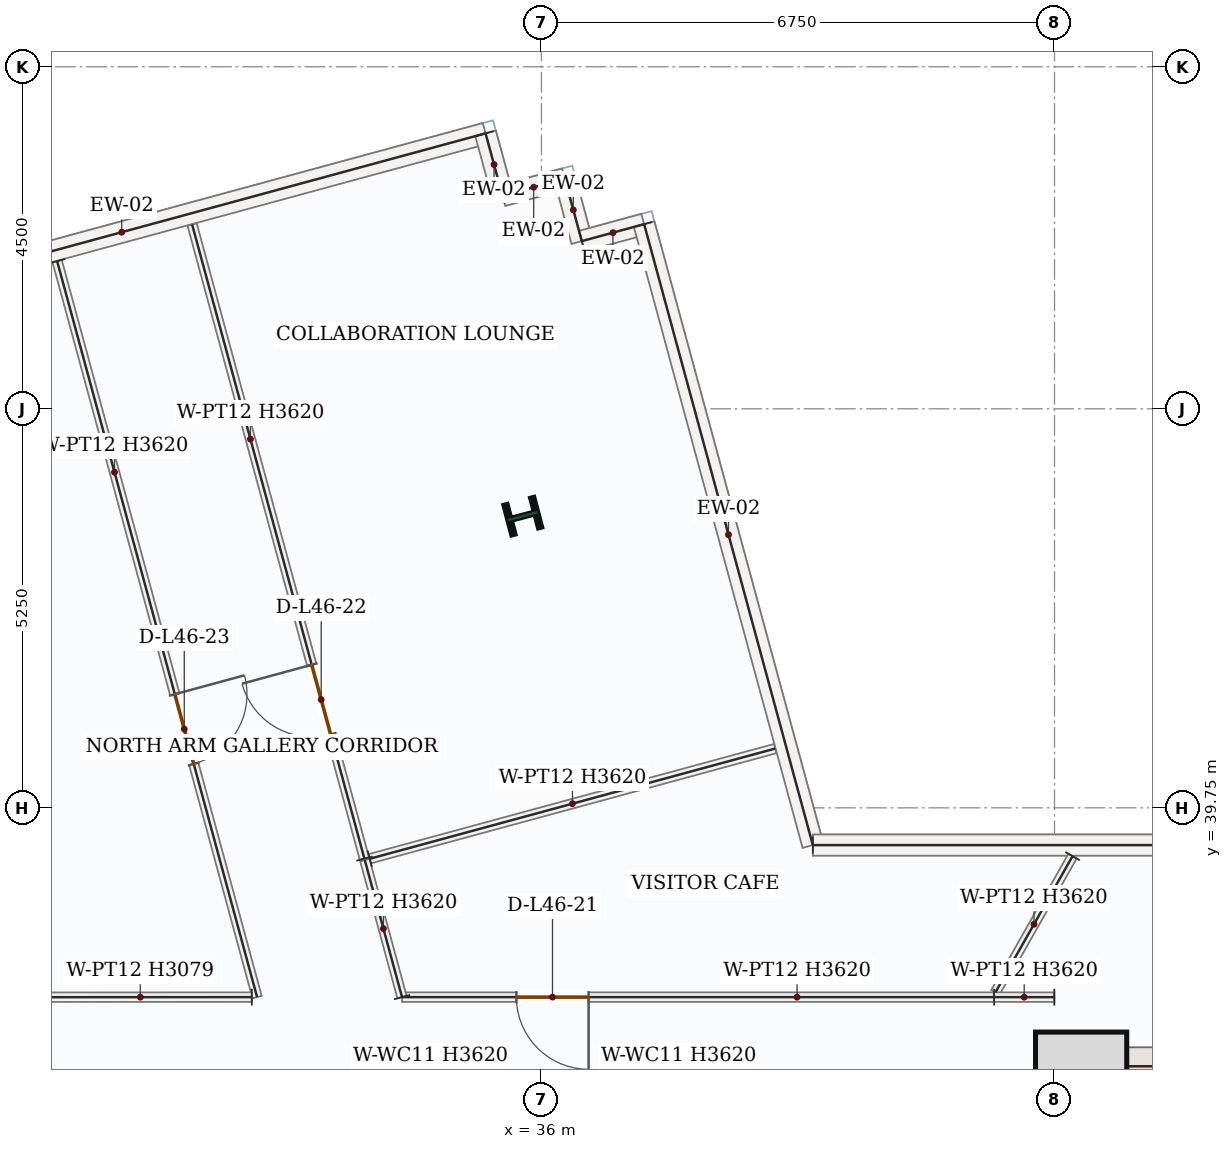
"""IFC4 building model, lengths in metres.
Left out: names, types, materials, properties, quantities, classifications, styles, units other than length and angle.
Written with IfcOpenShell. Run it as: python <this file> out.ifc"""

import sys

from ifc_helpers import new_model, si_unit, direction, frame, frame_2d, origin, origin_2d, place, context, subcontext, project, spatial, rectangle, i_section, extrude, source, transform, mapped, element, fill, save


model = new_model("IFC4")
c1 = context("Model", 3, precision=1e-05, world=origin(), true_north=direction((0.0, 1.0)))
c2 = subcontext(c1, "Body", "Model", "MODEL_VIEW")
j1 = project(units=[si_unit("LENGTHUNIT", "METRE"), si_unit("PLANEANGLEUNIT", "RADIAN")], contexts=[c1])
p1 = place(None, origin())
s1 = spatial("IfcSite", under=j1, at=p1, CompositionType="ELEMENT")
p2 = place(p1, origin())
s2 = spatial("IfcBuilding", under=s1, at=p2, CompositionType="ELEMENT")
p3 = place(p2, frame((0.0, 0.0, 198.0)))
s3 = spatial("IfcBuildingStorey", under=s2, at=p3, CompositionType="ELEMENT", Elevation=198.0)
p4 = place(p3, frame((43.0, 28.05, 0.0), z_axis=(0.0, 0.0, 1.0), x_axis=(0.0, 1.0, 0.0)))
e1 = element("IfcWall", 1, at=p4, inside=s3, PredefinedType="SHEAR", context=c2, shape_type="SweptSolid", body=[
    extrude(rectangle(XDim=8.55, YDim=0.5, at=frame_2d((4.275, 0.0))), origin(), (0.0, 0.0, 1.0), 3.62),
])
p5 = place(p4, frame((1.5, 0.0, 0.0)))
e2 = element("IfcOpeningElement", 2, at=p5, cuts=e1, PredefinedType="OPENING", context=c2, shape_type="SweptSolid", body=[
    extrude(rectangle(XDim=1.1, YDim=2.2, at=frame_2d((0.55, 1.1))), frame((0.0, 0.26, 0.0), z_axis=(0.0, -1.0, 0.0), x_axis=(1.0, 0.0, 0.0)), (0.0, 0.0, 1.0), 0.52),
])
m1 = source(origin(), c2, "Body", "SweptSolid", [
    extrude(rectangle(XDim=7.0, YDim=0.5, at=frame_2d((3.5, 0.0))), origin(), (0.0, 0.0, 1.0), 3.62),
])
p6 = place(p3, frame((43.25, 36.35, 0.0), z_axis=(0.0, 0.0, 1.0), x_axis=(1.0, 0.0, 0.0)))
e3 = element("IfcWall", 3, at=p6, inside=s3, PredefinedType="SHEAR", context=c2, shape_type="MappedRepresentation", body=[
    mapped(m1, transform((0.0, 0.0, 0.0), x_axis=(1.0, 0.0, 0.0), y_axis=(0.0, 1.0, 0.0), z_axis=(0.0, 0.0, 1.0), scale=1.0)),
])
m2 = source(origin(), c2, "Body", "SweptSolid", [
    extrude(rectangle(XDim=1.2, YDim=1.2, at=origin_2d()), origin(), (0.0, 0.0, 1.0), 3.9),
])
p7 = place(p3, frame((43.1, 36.2, 0.0), z_axis=(0.0, 0.0, 1.0), x_axis=(1.0, 0.0, 0.0)))
e4 = element("IfcColumn", 4, at=p7, inside=s3, PredefinedType="COLUMN", context=c2, shape_type="MappedRepresentation", body=[
    mapped(m2, transform((0.0, 0.0, 0.0), x_axis=(1.0, 0.0, 0.0), y_axis=(0.0, 1.0, 0.0), z_axis=(0.0, 0.0, 1.0), scale=1.0)),
])
m3 = source(origin(), c2, "Body", "SweptSolid", [
    extrude(i_section(OverallWidth=0.404, OverallDepth=0.407, WebThickness=0.027, FlangeThickness=0.044, FilletRadius=0.018, at=origin_2d()), origin(), (0.0, 0.0, 1.0), 3.9),
])
p8 = place(p3, frame((35.755, 43.588, 0.0), z_axis=(0.0, 0.0, 1.0), x_axis=(-0.255445757936, 0.966823388604, 0.0)))
e5 = element("IfcColumn", 5, at=p8, inside=s3, PredefinedType="COLUMN", context=c2, shape_type="MappedRepresentation", body=[
    mapped(m3, transform((0.0, 0.0, 0.0), x_axis=(1.0, 0.0, 0.0), y_axis=(0.0, 1.0, 0.0), z_axis=(0.0, 0.0, 1.0), scale=1.0)),
])
m4 = source(origin(), c2, "Body", "SweptSolid", [
    extrude(rectangle(XDim=9.92, YDim=0.28, at=frame_2d((4.96, 0.0))), origin(), (0.0, 0.0, 1.0), 3.62),
])
p9 = place(p3, frame((25.692, 46.023, 0.0), z_axis=(0.0, 0.0, 1.0), x_axis=(0.965012714082, 0.262203092393, 0.0)))
e6 = element("IfcWall", 6, at=p9, inside=s3, PredefinedType="SOLIDWALL", context=c2, shape_type="MappedRepresentation", body=[
    mapped(m4, transform((0.0, 0.0, 0.0), x_axis=(1.0, 0.0, 0.0), y_axis=(0.0, 1.0, 0.0), z_axis=(0.0, 0.0, 1.0), scale=1.0)),
])
m5 = source(origin(), c2, "Body", "SweptSolid", [
    extrude(rectangle(XDim=0.85, YDim=0.28, at=frame_2d((0.425, 0.0))), origin(), (0.0, 0.0, 1.0), 3.62),
])
for number, where, z_axis, x_axis in (
    (7, (35.265, 48.624, 0.0), (0.0, 0.0, 1.0), (0.262, -0.965, 0.0)),
    (8, (35.488, 47.803, 0.0), (0.0, 0.0, 1.0), (0.965, 0.262, 0.0)),
    (9, (36.308, 48.026, 0.0), (0.0, 0.0, 1.0), (0.262, -0.965, 0.0)),
    (10, (36.531, 47.206, 0.0), (0.0, 0.0, 1.0), (0.965, 0.262, 0.0)),
):
    element("IfcWall", number, at=place(p3, frame(where, z_axis=z_axis, x_axis=x_axis)), inside=s3, PredefinedType="SOLIDWALL", context=c2, shape_type="MappedRepresentation", body=[
        mapped(m5, transform((0.0, 0.0, 0.0), x_axis=(1.0, 0.0, 0.0), y_axis=(0.0, 1.0, 0.0), z_axis=(0.0, 0.0, 1.0), scale=1.0)),
    ])
m6 = source(origin(), c2, "Body", "SweptSolid", [
    extrude(rectangle(XDim=8.465, YDim=0.28, at=frame_2d((4.232, 0.0))), origin(), (0.0, 0.0, 1.0), 3.62),
])
p10 = place(p3, frame((37.351, 47.429, 0.0), z_axis=(0.0, 0.0, 1.0), x_axis=(0.262192380254, -0.965015624608, 0.0)))
e11 = element("IfcWall", 11, at=p10, inside=s3, PredefinedType="SOLIDWALL", context=c2, shape_type="MappedRepresentation", body=[
    mapped(m6, transform((0.0, 0.0, 0.0), x_axis=(1.0, 0.0, 0.0), y_axis=(0.0, 1.0, 0.0), z_axis=(0.0, 0.0, 1.0), scale=1.0)),
])
m7 = source(origin(), c2, "Body", "SweptSolid", [
    extrude(rectangle(XDim=9.771, YDim=0.28, at=frame_2d((4.886, 0.0))), origin(), (0.0, 0.0, 1.0), 3.62),
])
p11 = place(p3, frame((39.571, 39.26, 0.0), z_axis=(0.0, 0.0, 1.0), x_axis=(1.0, 0.0, 0.0)))
e12 = element("IfcWall", 12, at=p11, inside=s3, PredefinedType="SOLIDWALL", context=c2, shape_type="MappedRepresentation", body=[
    mapped(m7, transform((0.0, 0.0, 0.0), x_axis=(1.0, 0.0, 0.0), y_axis=(0.0, 1.0, 0.0), z_axis=(0.0, 0.0, 1.0), scale=1.0)),
])
p12 = place(p3, frame((41.955, 37.26, 0.0), z_axis=(0.0, 0.0, 1.0), x_axis=(-1.0, 0.0, 0.0)))
e13 = element("IfcWall", 13, at=p12, inside=s3, PredefinedType="PARTITIONING", context=c2, shape_type="SweptSolid", body=[
    extrude(rectangle(XDim=7.79, YDim=0.125, at=frame_2d((3.895, 0.0))), origin(), (0.0, 0.0, 1.0), 3.62),
])
p13 = place(p12, frame((5.335, 0.0, 0.0)))
e14 = element("IfcOpeningElement", 14, at=p13, cuts=e13, PredefinedType="OPENING", context=c2, shape_type="SweptSolid", body=[
    extrude(rectangle(XDim=0.95, YDim=2.15, at=frame_2d((0.475, 1.075))), frame((0.0, 0.073, 0.0), z_axis=(0.0, -1.0, 0.0), x_axis=(1.0, 0.0, 0.0)), (0.0, 0.0, 1.0), 0.145),
])
m8 = source(origin(), c2, "Body", "SweptSolid", [
    extrude(rectangle(XDim=1.868, YDim=0.125, at=frame_2d((0.934, 0.0))), origin(), (0.0, 0.0, 1.0), 3.62),
])
p14 = place(p3, frame((34.166, 37.26, 0.0), z_axis=(0.0, 0.0, 1.0), x_axis=(-0.262166249224, 0.965022723964, 0.0)))
e15 = element("IfcWall", 15, at=p14, inside=s3, PredefinedType="PARTITIONING", context=c2, shape_type="MappedRepresentation", body=[
    mapped(m8, transform((0.0, 0.0, 0.0), x_axis=(1.0, 0.0, 0.0), y_axis=(0.0, 1.0, 0.0), z_axis=(0.0, 0.0, 1.0), scale=1.0)),
])
m9 = source(origin(), c2, "Body", "SweptSolid", [
    extrude(rectangle(XDim=5.527, YDim=0.125, at=frame_2d((2.764, 0.0))), origin(), (0.0, 0.0, 1.0), 3.62),
])
p15 = place(p3, frame((33.741, 39.08, 0.0), z_axis=(0.0, 0.0, 1.0), x_axis=(0.965004985248, 0.262231535949, 0.0)))
e16 = element("IfcWall", 16, at=p15, inside=s3, PredefinedType="PARTITIONING", context=c2, shape_type="MappedRepresentation", body=[
    mapped(m9, transform((0.0, 0.0, 0.0), x_axis=(1.0, 0.0, 0.0), y_axis=(0.0, 1.0, 0.0), z_axis=(0.0, 0.0, 1.0), scale=1.0)),
])
m10 = source(origin(), c2, "Body", "SweptSolid", [
    extrude(rectangle(XDim=2.061, YDim=0.125, at=frame_2d((1.03, 0.0))), origin(), (0.0, 0.0, 1.0), 3.62),
])
p16 = place(p3, frame((42.987, 39.115, 0.0), z_axis=(0.0, 0.0, 1.0), x_axis=(-0.492818271576, -0.870132260752, 0.0)))
e17 = element("IfcWall", 17, at=p16, inside=s3, PredefinedType="PARTITIONING", context=c2, shape_type="MappedRepresentation", body=[
    mapped(m10, transform((0.0, 0.0, 0.0), x_axis=(1.0, 0.0, 0.0), y_axis=(0.0, 1.0, 0.0), z_axis=(0.0, 0.0, 1.0), scale=1.0)),
])
p17 = place(p3, frame((33.671, 39.082, 0.0), z_axis=(0.0, 0.0, 1.0), x_axis=(-0.262187726373, 0.965016889044, 0.0)))
e18 = element("IfcWall", 18, at=p17, inside=s3, PredefinedType="PARTITIONING", context=c2, shape_type="SweptSolid", body=[
    extrude(rectangle(XDim=8.645, YDim=0.125, at=frame_2d((4.323, 0.0))), origin(), (0.0, 0.0, 1.0), 3.62),
])
p18 = place(p17, frame((1.693, 0.0, 0.0)))
e19 = element("IfcOpeningElement", 19, at=p18, cuts=e18, PredefinedType="OPENING", context=c2, shape_type="SweptSolid", body=[
    extrude(rectangle(XDim=0.95, YDim=2.15, at=frame_2d((0.475, 1.075))), frame((0.0, 0.073, 0.0), z_axis=(0.0, -1.0, 0.0), x_axis=(1.0, 0.0, 0.0)), (0.0, 0.0, 1.0), 0.145),
])
p19 = place(p3, frame((29.628, 46.942, 0.0), z_axis=(0.0, 0.0, 1.0), x_axis=(0.262192801501, -0.965015510156, 0.0)))
e20 = element("IfcWall", 20, at=p19, inside=s3, PredefinedType="PARTITIONING", context=c2, shape_type="SweptSolid", body=[
    extrude(rectangle(XDim=10.033, YDim=0.125, at=frame_2d((5.017, 0.0))), origin(), (0.0, 0.0, 1.0), 3.62),
])
p20 = place(p19, frame((5.904, 0.0, 0.0)))
e21 = element("IfcOpeningElement", 21, at=p20, cuts=e20, PredefinedType="OPENING", context=c2, shape_type="SweptSolid", body=[
    extrude(rectangle(XDim=0.95, YDim=2.15, at=frame_2d((0.475, 1.075))), frame((0.0, 0.073, 0.0), z_axis=(0.0, -1.0, 0.0), x_axis=(1.0, 0.0, 0.0)), (0.0, 0.0, 1.0), 0.145),
])
m11 = source(origin(), c2, "Body", "SweptSolid", [
    extrude(rectangle(XDim=2.934, YDim=0.125, at=frame_2d((1.467, 0.0))), origin(), (0.0, 0.0, 1.0), 3.079),
])
p21 = place(p3, frame((32.189, 37.26, 0.0), z_axis=(0.0, 0.0, 1.0), x_axis=(-0.999999913469, -0.000416007951, 0.0)))
e22 = element("IfcWall", 22, at=p21, inside=s3, PredefinedType="PARTITIONING", context=c2, shape_type="MappedRepresentation", body=[
    mapped(m11, transform((0.0, 0.0, 0.0), x_axis=(1.0, 0.0, 0.0), y_axis=(0.0, 1.0, 0.0), z_axis=(0.0, 0.0, 1.0), scale=1.0)),
])
m12 = source(origin(), c2, "Body", "SweptSolid", [
    extrude(rectangle(XDim=0.792, YDim=0.125, at=frame_2d((0.396, 0.0))), origin(), (0.0, 0.0, 1.0), 3.62),
])
p22 = place(p3, frame((42.748, 37.259, 0.0), z_axis=(0.0, 0.0, 1.0), x_axis=(-0.999999572651, 0.000924498835, 0.0)))
e23 = element("IfcWall", 23, at=p22, inside=s3, PredefinedType="PARTITIONING", context=c2, shape_type="MappedRepresentation", body=[
    mapped(m12, transform((0.0, 0.0, 0.0), x_axis=(1.0, 0.0, 0.0), y_axis=(0.0, 1.0, 0.0), z_axis=(0.0, 0.0, 1.0), scale=1.0)),
])
m13 = source(origin(), c2, "Body", "SweptSolid", [
    extrude(rectangle(XDim=0.95, YDim=2.15, at=frame_2d((0.475, 1.075))), frame((0.0, 0.025, 0.0), z_axis=(0.0, -1.0, 0.0), x_axis=(1.0, 0.0, 0.0)), (0.0, 0.0, 1.0), 0.05),
])
p23 = place(p13, origin())
e24 = element("IfcDoor", 24, at=p23, inside=s3, OperationType="SINGLE_SWING_LEFT", PredefinedType="DOOR", context=c2, shape_type="MappedRepresentation", body=[
    mapped(m13, transform((0.0, 0.0, 0.0), x_axis=(1.0, 0.0, 0.0), y_axis=(0.0, 1.0, 0.0), z_axis=(0.0, 0.0, 1.0), scale=1.0)),
])
fill(e14, e24)
p24 = place(p18, origin())
e25 = element("IfcDoor", 25, at=p24, inside=s3, OperationType="SINGLE_SWING_RIGHT", PredefinedType="DOOR", context=c2, shape_type="MappedRepresentation", body=[
    mapped(m13, transform((0.0, 0.0, 0.0), x_axis=(1.0, 0.0, 0.0), y_axis=(0.0, 1.0, 0.0), z_axis=(0.0, 0.0, 1.0), scale=1.0)),
])
fill(e19, e25)
p25 = place(p20, origin())
e26 = element("IfcDoor", 26, at=p25, inside=s3, OperationType="SINGLE_SWING_LEFT", PredefinedType="DOOR", context=c2, shape_type="MappedRepresentation", body=[
    mapped(m13, transform((0.0, 0.0, 0.0), x_axis=(1.0, 0.0, 0.0), y_axis=(0.0, 1.0, 0.0), z_axis=(0.0, 0.0, 1.0), scale=1.0)),
])
fill(e21, e26)
save(model, sys.argv[1])
